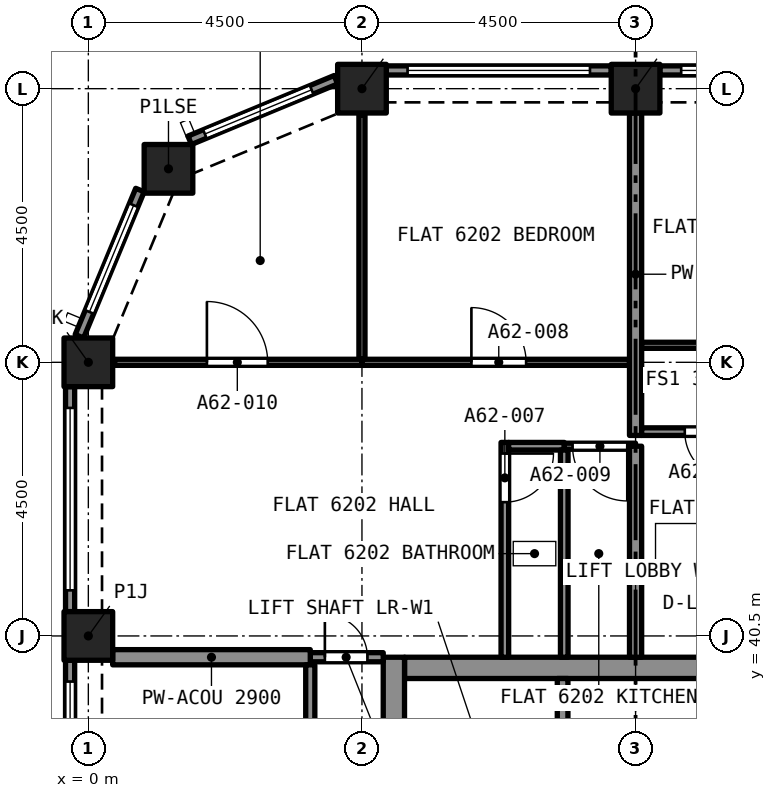
"""IFC4 building model, lengths in metres.
Left out: names, types, materials, properties, quantities, classifications, styles, units other than length and angle.
Written with IfcOpenShell. Run it as: python <this file> out.ifc"""

import sys

from ifc_helpers import new_model, si_unit, direction, frame, frame_2d, origin, origin_2d, place, context, subcontext, project, spatial, rectangle, extrude, element, fill, save


model = new_model("IFC4")
c1 = context("Model", 3, precision=1e-05, world=origin(), true_north=direction((0.0, 1.0)))
c2 = subcontext(c1, "Body", "Model", "MODEL_VIEW")
j1 = project(units=[si_unit("LENGTHUNIT", "METRE"), si_unit("PLANEANGLEUNIT", "RADIAN")], contexts=[c1])
p1 = place(None, origin())
s1 = spatial("IfcSite", under=j1, at=p1, CompositionType="ELEMENT")
p2 = place(p1, origin())
s2 = spatial("IfcBuilding", under=s1, at=p2, CompositionType="ELEMENT")
p3 = place(p2, frame((0.0, 0.0, 222.895)))
s3 = spatial("IfcBuildingStorey", under=s2, at=p3, CompositionType="ELEMENT", Elevation=222.895)
for number, where, z_axis, x_axis in (
    (1, (0.0, 40.5, 0.0), (0.0, 0.0, 1.0), (1.0, 0.0, 0.0)),
    (2, (0.0, 45.0, 0.0), (0.0, 0.0, 1.0), (1.0, 0.0, 0.0)),
    (3, (1.318, 48.182, 0.0), (0.0, 0.0, 1.0), (1.0, 0.0, 0.0)),
    (4, (4.5, 49.5, 0.0), (0.0, 0.0, 1.0), (1.0, 0.0, 0.0)),
    (5, (9.0, 49.5, 0.0), (0.0, 0.0, 1.0), (1.0, 0.0, 0.0)),
):
    element("IfcColumn", number, at=place(p3, frame(where, z_axis=z_axis, x_axis=x_axis)), inside=s3, PredefinedType="COLUMN", context=c2, shape_type="SweptSolid", body=[
        extrude(rectangle(XDim=0.8, YDim=0.8, at=origin_2d()), origin(), (0.0, 0.0, 1.0), 3.2),
    ])
p4 = place(p3, frame((5.2, 39.975, 0.0), z_axis=(0.0, 0.0, 1.0), x_axis=(1.0, 0.0, 0.0)))
e6 = element("IfcWall", 6, at=p4, inside=s3, PredefinedType="SOLIDWALL", context=c2, shape_type="SweptSolid", body=[
    extrude(rectangle(XDim=7.6, YDim=0.35, at=frame_2d((3.8, 0.0))), origin(), (0.0, 0.0, 1.0), 3.2),
])
p5 = place(p3, frame((5.025, 27.35, 0.0), z_axis=(0.0, 0.0, 1.0), x_axis=(0.0, 1.0, 0.0)))
e7 = element("IfcWall", 7, at=p5, inside=s3, PredefinedType="SOLIDWALL", context=c2, shape_type="SweptSolid", body=[
    extrude(rectangle(XDim=12.8, YDim=0.35, at=frame_2d((6.4, 0.0))), origin(), (0.0, 0.0, 1.0), 3.2),
])
p6 = place(p5, frame((8.6, 0.0, 0.0)))
e8 = element("IfcOpeningElement", 8, at=p6, cuts=e7, PredefinedType="OPENING", context=c2, shape_type="SweptSolid", body=[
    extrude(rectangle(XDim=1.2, YDim=2.1, at=frame_2d((0.6, 1.05))), frame((0.0, 0.185, 0.0), z_axis=(0.0, -1.0, 0.0), x_axis=(1.0, 0.0, 0.0)), (0.0, 0.0, 1.0), 0.37),
])
p7 = place(p3, frame((9.4, 49.8, 0.0), z_axis=(0.0, 0.0, 1.0), x_axis=(1.0, 0.0, 0.0)))
e9 = element("IfcWall", 9, at=p7, inside=s3, PredefinedType="SOLIDWALL", context=c2, shape_type="SweptSolid", body=[
    extrude(rectangle(XDim=3.7, YDim=0.15, at=frame_2d((1.85, 0.0))), origin(), (0.0, 0.0, 1.0), 3.2),
])
p8 = place(p7, frame((0.35, 0.0, 0.45)))
e10 = element("IfcOpeningElement", 10, at=p8, cuts=e9, PredefinedType="OPENING", context=c2, shape_type="SweptSolid", body=[
    extrude(rectangle(XDim=3.0, YDim=1.95, at=frame_2d((1.5, 0.975))), frame((0.0, 0.085, 0.0), z_axis=(0.0, -1.0, 0.0), x_axis=(1.0, 0.0, 0.0)), (0.0, 0.0, 1.0), 0.17),
])
p9 = place(p3, frame((4.9, 49.8, 0.0), z_axis=(0.0, 0.0, 1.0), x_axis=(1.0, 0.0, 0.0)))
e11 = element("IfcWall", 11, at=p9, inside=s3, PredefinedType="SOLIDWALL", context=c2, shape_type="SweptSolid", body=[
    extrude(rectangle(XDim=3.7, YDim=0.15, at=frame_2d((1.85, 0.0))), origin(), (0.0, 0.0, 1.0), 3.2),
])
p10 = place(p9, frame((0.35, 0.0, 0.45)))
e12 = element("IfcOpeningElement", 12, at=p10, cuts=e11, PredefinedType="OPENING", context=c2, shape_type="SweptSolid", body=[
    extrude(rectangle(XDim=3.0, YDim=1.95, at=frame_2d((1.5, 0.975))), frame((0.0, 0.085, 0.0), z_axis=(0.0, -1.0, 0.0), x_axis=(1.0, 0.0, 0.0)), (0.0, 0.0, 1.0), 0.17),
])
p11 = place(p3, frame((1.667, 48.651, 0.0), z_axis=(0.0, 0.0, 1.0), x_axis=(0.923885342263, 0.382669406082, 0.0)))
e13 = element("IfcWall", 13, at=p11, inside=s3, PredefinedType="SOLIDWALL", context=c2, shape_type="SweptSolid", body=[
    extrude(rectangle(XDim=2.602, YDim=0.15, at=frame_2d((1.301, 0.0))), origin(), (0.0, 0.0, 1.0), 3.2),
])
p12 = place(p11, frame((0.27, 0.0, 0.45)))
e14 = element("IfcOpeningElement", 14, at=p12, cuts=e13, PredefinedType="OPENING", context=c2, shape_type="SweptSolid", body=[
    extrude(rectangle(XDim=1.9, YDim=1.95, at=frame_2d((0.95, 0.975))), frame((0.0, 0.085, 0.0), z_axis=(0.0, -1.0, 0.0), x_axis=(1.0, 0.0, 0.0)), (0.0, 0.0, 1.0), 0.17),
])
p13 = place(p3, frame((-0.147, 45.429, 0.0), z_axis=(0.0, 0.0, 1.0), x_axis=(0.382669406082, 0.923885342263, 0.0)))
e15 = element("IfcWall", 15, at=p13, inside=s3, PredefinedType="SOLIDWALL", context=c2, shape_type="SweptSolid", body=[
    extrude(rectangle(XDim=2.602, YDim=0.15, at=frame_2d((1.301, 0.0))), origin(), (0.0, 0.0, 1.0), 3.2),
])
p14 = place(p13, frame((0.432, 0.0, 0.45)))
e16 = element("IfcOpeningElement", 16, at=p14, cuts=e15, PredefinedType="OPENING", context=c2, shape_type="SweptSolid", body=[
    extrude(rectangle(XDim=1.9, YDim=1.95, at=frame_2d((0.95, 0.975))), frame((0.0, 0.085, 0.0), z_axis=(0.0, -1.0, 0.0), x_axis=(1.0, 0.0, 0.0)), (0.0, 0.0, 1.0), 0.17),
])
p15 = place(p3, frame((-0.3, 40.9, 0.0), z_axis=(0.0, 0.0, 1.0), x_axis=(0.0, 1.0, 0.0)))
e17 = element("IfcWall", 17, at=p15, inside=s3, PredefinedType="SOLIDWALL", context=c2, shape_type="SweptSolid", body=[
    extrude(rectangle(XDim=3.7, YDim=0.15, at=frame_2d((1.85, 0.0))), origin(), (0.0, 0.0, 1.0), 3.2),
])
p16 = place(p15, frame((0.35, 0.0, 0.45)))
e18 = element("IfcOpeningElement", 18, at=p16, cuts=e17, PredefinedType="OPENING", context=c2, shape_type="SweptSolid", body=[
    extrude(rectangle(XDim=3.0, YDim=1.95, at=frame_2d((1.5, 0.975))), frame((0.0, 0.085, 0.0), z_axis=(0.0, -1.0, 0.0), x_axis=(1.0, 0.0, 0.0)), (0.0, 0.0, 1.0), 0.17),
])
p17 = place(p3, frame((-0.3, 36.4, 0.0), z_axis=(0.0, 0.0, 1.0), x_axis=(0.0, 1.0, 0.0)))
e19 = element("IfcWall", 19, at=p17, inside=s3, PredefinedType="SOLIDWALL", context=c2, shape_type="SweptSolid", body=[
    extrude(rectangle(XDim=3.7, YDim=0.15, at=frame_2d((1.85, 0.0))), origin(), (0.0, 0.0, 1.0), 3.2),
])
p18 = place(p17, frame((0.35, 0.0, 0.45)))
e20 = element("IfcOpeningElement", 20, at=p18, cuts=e19, PredefinedType="OPENING", context=c2, shape_type="SweptSolid", body=[
    extrude(rectangle(XDim=3.0, YDim=1.95, at=frame_2d((1.5, 0.975))), frame((0.0, 0.085, 0.0), z_axis=(0.0, -1.0, 0.0), x_axis=(1.0, 0.0, 0.0)), (0.0, 0.0, 1.0), 0.17),
])
p19 = place(p3, frame((6.85, 43.683, 0.0), z_axis=(0.0, 0.0, 1.0), x_axis=(0.0, -1.0, 0.0)))
e21 = element("IfcWall", 21, at=p19, inside=s3, PredefinedType="PARTITIONING", context=c2, shape_type="SweptSolid", body=[
    extrude(rectangle(XDim=3.533, YDim=0.125, at=frame_2d((1.766, 0.0))), origin(), (0.0, 0.0, 1.0), 2.9),
])
p20 = place(p19, frame((0.183, 0.0, 0.0)))
e22 = element("IfcOpeningElement", 22, at=p20, cuts=e21, PredefinedType="OPENING", context=c2, shape_type="SweptSolid", body=[
    extrude(rectangle(XDim=0.8, YDim=2.1, at=frame_2d((0.4, 1.05))), frame((0.0, 0.073, 0.0), z_axis=(0.0, -1.0, 0.0), x_axis=(1.0, 0.0, 0.0)), (0.0, 0.0, 1.0), 0.145),
])
p21 = place(p3, frame((6.913, 43.62, 0.0), z_axis=(0.0, 0.0, 1.0), x_axis=(1.0, 0.0, 0.0)))
e23 = element("IfcWall", 23, at=p21, inside=s3, PredefinedType="PARTITIONING", context=c2, shape_type="SweptSolid", body=[
    extrude(rectangle(XDim=0.915, YDim=0.125, at=frame_2d((0.458, 0.0))), origin(), (0.0, 0.0, 1.0), 2.9),
])
p22 = place(p3, frame((7.827, 40.15, 0.0), z_axis=(0.0, 0.0, 1.0), x_axis=(0.0, 1.0, 0.0)))
e24 = element("IfcWall", 24, at=p22, inside=s3, PredefinedType="PARTITIONING", context=c2, shape_type="SweptSolid", body=[
    extrude(rectangle(XDim=3.408, YDim=0.125, at=frame_2d((1.704, 0.0))), origin(), (0.0, 0.0, 1.0), 2.9),
])
p23 = place(p3, frame((4.5, 45.0, 0.0), z_axis=(0.0, 0.0, 1.0), x_axis=(1.0, 0.0, 0.0)))
e25 = element("IfcWall", 25, at=p23, inside=s3, PredefinedType="PARTITIONING", context=c2, shape_type="SweptSolid", body=[
    extrude(rectangle(XDim=4.4, YDim=0.1, at=frame_2d((2.2, 0.0))), origin(), (0.0, 0.0, 1.0), 2.9),
])
p24 = place(p23, frame((1.8, 0.0, 0.0)))
e26 = element("IfcOpeningElement", 26, at=p24, cuts=e25, PredefinedType="OPENING", context=c2, shape_type="SweptSolid", body=[
    extrude(rectangle(XDim=0.9, YDim=2.1, at=frame_2d((0.45, 1.05))), frame((0.0, 0.06, 0.0), z_axis=(0.0, -1.0, 0.0), x_axis=(1.0, 0.0, 0.0)), (0.0, 0.0, 1.0), 0.12),
])
p25 = place(p3, frame((4.5, 45.05, 0.0), z_axis=(0.0, 0.0, 1.0), x_axis=(0.0, 1.0, 0.0)))
e27 = element("IfcWall", 27, at=p25, inside=s3, PredefinedType="PARTITIONING", context=c2, shape_type="SweptSolid", body=[
    extrude(rectangle(XDim=4.017, YDim=0.1, at=frame_2d((2.009, 0.0))), origin(), (0.0, 0.0, 1.0), 2.9),
])
p26 = place(p3, frame((9.0, 43.62, 0.0), z_axis=(0.0, 0.0, 1.0), x_axis=(-1.0, 0.0, 0.0)))
e28 = element("IfcWall", 28, at=p26, inside=s3, PredefinedType="PARTITIONING", context=c2, shape_type="SweptSolid", body=[
    extrude(rectangle(XDim=1.173, YDim=0.1, at=frame_2d((0.586, 0.0))), origin(), (0.0, 0.0, 1.0), 2.9),
])
p27 = place(p26, frame((0.136, 0.0, 0.0)))
e29 = element("IfcOpeningElement", 29, at=p27, cuts=e28, PredefinedType="OPENING", context=c2, shape_type="SweptSolid", body=[
    extrude(rectangle(XDim=0.9, YDim=2.1, at=frame_2d((0.45, 1.05))), frame((0.0, 0.06, 0.0), z_axis=(0.0, -1.0, 0.0), x_axis=(1.0, 0.0, 0.0)), (0.0, 0.0, 1.0), 0.12),
])
p28 = place(p3, frame((0.433, 45.0, 0.0), z_axis=(0.0, 0.0, 1.0), x_axis=(1.0, 0.0, 0.0)))
e30 = element("IfcWall", 30, at=p28, inside=s3, PredefinedType="PARTITIONING", context=c2, shape_type="SweptSolid", body=[
    extrude(rectangle(XDim=4.067, YDim=0.1, at=frame_2d((2.034, 0.0))), origin(), (0.0, 0.0, 1.0), 2.9),
])
p29 = place(p28, frame((1.517, 0.0, 0.0)))
e31 = element("IfcOpeningElement", 31, at=p29, cuts=e30, PredefinedType="OPENING", context=c2, shape_type="SweptSolid", body=[
    extrude(rectangle(XDim=1.0, YDim=2.1, at=frame_2d((0.5, 1.05))), frame((0.0, 0.06, 0.0), z_axis=(0.0, -1.0, 0.0), x_axis=(1.0, 0.0, 0.0)), (0.0, 0.0, 1.0), 0.12),
])
p30 = place(p3, frame((9.0, 43.798, 0.0), z_axis=(0.0, 0.0, 1.0), x_axis=(0.0, 1.0, 0.0)))
e32 = element("IfcWall", 32, at=p30, inside=s3, PredefinedType="PARTITIONING", context=c2, shape_type="SweptSolid", body=[
    extrude(rectangle(XDim=5.302, YDim=0.2, at=frame_2d((2.651, 0.0))), origin(), (0.0, 0.0, 1.0), 2.9),
])
p31 = place(p3, frame((3.65, 40.15, 0.0), z_axis=(0.0, 0.0, 1.0), x_axis=(1.0, 0.0, 0.0)))
e33 = element("IfcWall", 33, at=p31, inside=s3, PredefinedType="PARTITIONING", context=c2, shape_type="SweptSolid", body=[
    extrude(rectangle(XDim=1.2, YDim=0.15, at=frame_2d((0.6, 0.0))), origin(), (0.0, 0.0, 1.0), 2.9),
])
p32 = place(p31, frame((0.24, 0.0, 0.0)))
e34 = element("IfcOpeningElement", 34, at=p32, cuts=e33, PredefinedType="OPENING", context=c2, shape_type="SweptSolid", body=[
    extrude(rectangle(XDim=0.7, YDim=2.1, at=frame_2d((0.35, 1.05))), frame((0.0, 0.085, 0.0), z_axis=(0.0, -1.0, 0.0), x_axis=(1.0, 0.0, 0.0)), (0.0, 0.0, 1.0), 0.17),
])
p33 = place(p3, frame((0.4, 40.15, 0.0), z_axis=(0.0, 0.0, 1.0), x_axis=(1.0, 0.0, 0.0)))
e35 = element("IfcWall", 35, at=p33, inside=s3, PredefinedType="PARTITIONING", context=c2, shape_type="SweptSolid", body=[
    extrude(rectangle(XDim=3.25, YDim=0.25, at=frame_2d((1.625, 0.0))), origin(), (0.0, 0.0, 1.0), 2.9),
])
p34 = place(p3, frame((9.0, 40.15, 0.0), z_axis=(0.0, 0.0, 1.0), x_axis=(0.0, 1.0, 0.0)))
e36 = element("IfcWall", 36, at=p34, inside=s3, PredefinedType="PARTITIONING", context=c2, shape_type="SweptSolid", body=[
    extrude(rectangle(XDim=3.47, YDim=0.2, at=frame_2d((1.735, 0.0))), origin(), (0.0, 0.0, 1.0), 2.9),
])
p35 = place(p3, frame((11.418, 43.86, 0.0), z_axis=(0.0, 0.0, 1.0), x_axis=(-1.0, 0.0, 0.0)))
e37 = element("IfcWall", 37, at=p35, inside=s3, PredefinedType="PARTITIONING", context=c2, shape_type="SweptSolid", body=[
    extrude(rectangle(XDim=2.318, YDim=0.125, at=frame_2d((1.159, 0.0))), origin(), (0.0, 0.0, 1.0), 2.9),
])
p36 = place(p35, frame((0.809, 0.0, 0.0)))
e38 = element("IfcOpeningElement", 38, at=p36, cuts=e37, PredefinedType="OPENING", context=c2, shape_type="SweptSolid", body=[
    extrude(rectangle(XDim=0.8, YDim=2.1, at=frame_2d((0.4, 1.05))), frame((0.0, 0.073, 0.0), z_axis=(0.0, -1.0, 0.0), x_axis=(1.0, 0.0, 0.0)), (0.0, 0.0, 1.0), 0.145),
])
p37 = place(p3, frame((9.1, 45.28, 0.0), z_axis=(0.0, 0.0, 1.0), x_axis=(1.0, 0.0, 0.0)))
e39 = element("IfcWall", 39, at=p37, inside=s3, PredefinedType="PARTITIONING", context=c2, shape_type="SweptSolid", body=[
    extrude(rectangle(XDim=4.4, YDim=0.1, at=frame_2d((2.2, 0.0))), origin(), (0.0, 0.0, 1.0), 2.9),
])
p38 = place(p37, frame((1.65, 0.0, 0.0)))
e40 = element("IfcOpeningElement", 40, at=p38, cuts=e39, PredefinedType="OPENING", context=c2, shape_type="SweptSolid", body=[
    extrude(rectangle(XDim=1.0, YDim=2.1, at=frame_2d((0.5, 1.05))), frame((0.0, 0.06, 0.0), z_axis=(0.0, -1.0, 0.0), x_axis=(1.0, 0.0, 0.0)), (0.0, 0.0, 1.0), 0.12),
])
p39 = place(p3, frame((3.65, 36.0, 0.0), z_axis=(0.0, 0.0, 1.0), x_axis=(0.0, 1.0, 0.0)))
e41 = element("IfcWall", 41, at=p39, inside=s3, PredefinedType="PARTITIONING", context=c2, shape_type="SweptSolid", body=[
    extrude(rectangle(XDim=4.025, YDim=0.15, at=frame_2d((2.012, 0.0))), origin(), (0.0, 0.0, 1.0), 2.9),
])
p40 = place(p39, frame((1.575, 0.0, 0.0)))
e42 = element("IfcOpeningElement", 42, at=p40, cuts=e41, PredefinedType="OPENING", context=c2, shape_type="SweptSolid", body=[
    extrude(rectangle(XDim=1.0, YDim=2.1, at=frame_2d((0.5, 1.05))), frame((0.0, 0.085, 0.0), z_axis=(0.0, -1.0, 0.0), x_axis=(1.0, 0.0, 0.0)), (0.0, 0.0, 1.0), 0.17),
])
p41 = place(p3, frame((7.8, 37.5, 0.0), z_axis=(0.0, 0.0, 1.0), x_axis=(0.0, 1.0, 0.0)))
e43 = element("IfcWall", 43, at=p41, inside=s3, PredefinedType="SOLIDWALL", context=c2, shape_type="SweptSolid", body=[
    extrude(rectangle(XDim=2.3, YDim=0.175, at=frame_2d((1.15, 0.0))), origin(), (0.0, 0.0, 1.0), 2.9),
])
p42 = place(p8, origin())
e44 = element("IfcWindow", 44, at=p42, inside=s3, PartitioningType="SINGLE_PANEL", PredefinedType="WINDOW", context=c2, shape_type="SweptSolid", body=[
    extrude(rectangle(XDim=3.0, YDim=1.95, at=frame_2d((1.5, 0.975))), frame((0.0, 0.03, 0.0), z_axis=(0.0, -1.0, 0.0), x_axis=(1.0, 0.0, 0.0)), (0.0, 0.0, 1.0), 0.06),
])
fill(e10, e44)
p43 = place(p10, origin())
e45 = element("IfcWindow", 45, at=p43, inside=s3, PartitioningType="SINGLE_PANEL", PredefinedType="WINDOW", context=c2, shape_type="SweptSolid", body=[
    extrude(rectangle(XDim=3.0, YDim=1.95, at=frame_2d((1.5, 0.975))), frame((0.0, 0.03, 0.0), z_axis=(0.0, -1.0, 0.0), x_axis=(1.0, 0.0, 0.0)), (0.0, 0.0, 1.0), 0.06),
])
fill(e12, e45)
p44 = place(p12, origin())
e46 = element("IfcWindow", 46, at=p44, inside=s3, PartitioningType="SINGLE_PANEL", PredefinedType="WINDOW", context=c2, shape_type="SweptSolid", body=[
    extrude(rectangle(XDim=1.9, YDim=1.95, at=frame_2d((0.95, 0.975))), frame((0.0, 0.03, 0.0), z_axis=(0.0, -1.0, 0.0), x_axis=(1.0, 0.0, 0.0)), (0.0, 0.0, 1.0), 0.06),
])
fill(e14, e46)
p45 = place(p14, origin())
e47 = element("IfcWindow", 47, at=p45, inside=s3, PartitioningType="SINGLE_PANEL", PredefinedType="WINDOW", context=c2, shape_type="SweptSolid", body=[
    extrude(rectangle(XDim=1.9, YDim=1.95, at=frame_2d((0.95, 0.975))), frame((0.0, 0.03, 0.0), z_axis=(0.0, -1.0, 0.0), x_axis=(1.0, 0.0, 0.0)), (0.0, 0.0, 1.0), 0.06),
])
fill(e16, e47)
p46 = place(p16, origin())
e48 = element("IfcWindow", 48, at=p46, inside=s3, PartitioningType="SINGLE_PANEL", PredefinedType="WINDOW", context=c2, shape_type="SweptSolid", body=[
    extrude(rectangle(XDim=3.0, YDim=1.95, at=frame_2d((1.5, 0.975))), frame((0.0, 0.03, 0.0), z_axis=(0.0, -1.0, 0.0), x_axis=(1.0, 0.0, 0.0)), (0.0, 0.0, 1.0), 0.06),
])
fill(e18, e48)
p47 = place(p18, origin())
e49 = element("IfcWindow", 49, at=p47, inside=s3, PartitioningType="SINGLE_PANEL", PredefinedType="WINDOW", context=c2, shape_type="SweptSolid", body=[
    extrude(rectangle(XDim=3.0, YDim=1.95, at=frame_2d((1.5, 0.975))), frame((0.0, 0.03, 0.0), z_axis=(0.0, -1.0, 0.0), x_axis=(1.0, 0.0, 0.0)), (0.0, 0.0, 1.0), 0.06),
])
fill(e20, e49)
p48 = place(p20, origin())
e50 = element("IfcDoor", 50, at=p48, inside=s3, OperationType="SINGLE_SWING_LEFT", PredefinedType="DOOR", context=c2, shape_type="SweptSolid", body=[
    extrude(rectangle(XDim=0.8, YDim=2.1, at=frame_2d((0.4, 1.05))), frame((0.0, 0.025, 0.0), z_axis=(0.0, -1.0, 0.0), x_axis=(1.0, 0.0, 0.0)), (0.0, 0.0, 1.0), 0.05),
])
fill(e22, e50)
p49 = place(p24, origin())
e51 = element("IfcDoor", 51, at=p49, inside=s3, OperationType="SINGLE_SWING_RIGHT", PredefinedType="DOOR", context=c2, shape_type="SweptSolid", body=[
    extrude(rectangle(XDim=0.9, YDim=2.1, at=frame_2d((0.45, 1.05))), frame((0.0, 0.025, 0.0), z_axis=(0.0, -1.0, 0.0), x_axis=(1.0, 0.0, 0.0)), (0.0, 0.0, 1.0), 0.05),
])
fill(e26, e51)
p50 = place(p27, origin())
e52 = element("IfcDoor", 52, at=p50, inside=s3, OperationType="SINGLE_SWING_RIGHT", PredefinedType="DOOR", context=c2, shape_type="SweptSolid", body=[
    extrude(rectangle(XDim=0.9, YDim=2.1, at=frame_2d((0.45, 1.05))), frame((0.0, 0.025, 0.0), z_axis=(0.0, -1.0, 0.0), x_axis=(1.0, 0.0, 0.0)), (0.0, 0.0, 1.0), 0.05),
])
fill(e29, e52)
p51 = place(p29, origin())
e53 = element("IfcDoor", 53, at=p51, inside=s3, OperationType="SINGLE_SWING_LEFT", PredefinedType="DOOR", context=c2, shape_type="SweptSolid", body=[
    extrude(rectangle(XDim=1.0, YDim=2.1, at=frame_2d((0.5, 1.05))), frame((0.0, 0.025, 0.0), z_axis=(0.0, -1.0, 0.0), x_axis=(1.0, 0.0, 0.0)), (0.0, 0.0, 1.0), 0.05),
])
fill(e31, e53)
p52 = place(p32, origin())
e54 = element("IfcDoor", 54, at=p52, inside=s3, OperationType="SINGLE_SWING_LEFT", PredefinedType="DOOR", context=c2, shape_type="SweptSolid", body=[
    extrude(rectangle(XDim=0.7, YDim=2.1, at=frame_2d((0.35, 1.05))), frame((0.0, 0.025, 0.0), z_axis=(0.0, -1.0, 0.0), x_axis=(1.0, 0.0, 0.0)), (0.0, 0.0, 1.0), 0.05),
])
fill(e34, e54)
p53 = place(p36, origin())
e55 = element("IfcDoor", 55, at=p53, inside=s3, OperationType="SINGLE_SWING_RIGHT", PredefinedType="DOOR", context=c2, shape_type="SweptSolid", body=[
    extrude(rectangle(XDim=0.8, YDim=2.1, at=frame_2d((0.4, 1.05))), frame((0.0, 0.025, 0.0), z_axis=(0.0, -1.0, 0.0), x_axis=(1.0, 0.0, 0.0)), (0.0, 0.0, 1.0), 0.05),
])
fill(e38, e55)
save(model, sys.argv[1])
